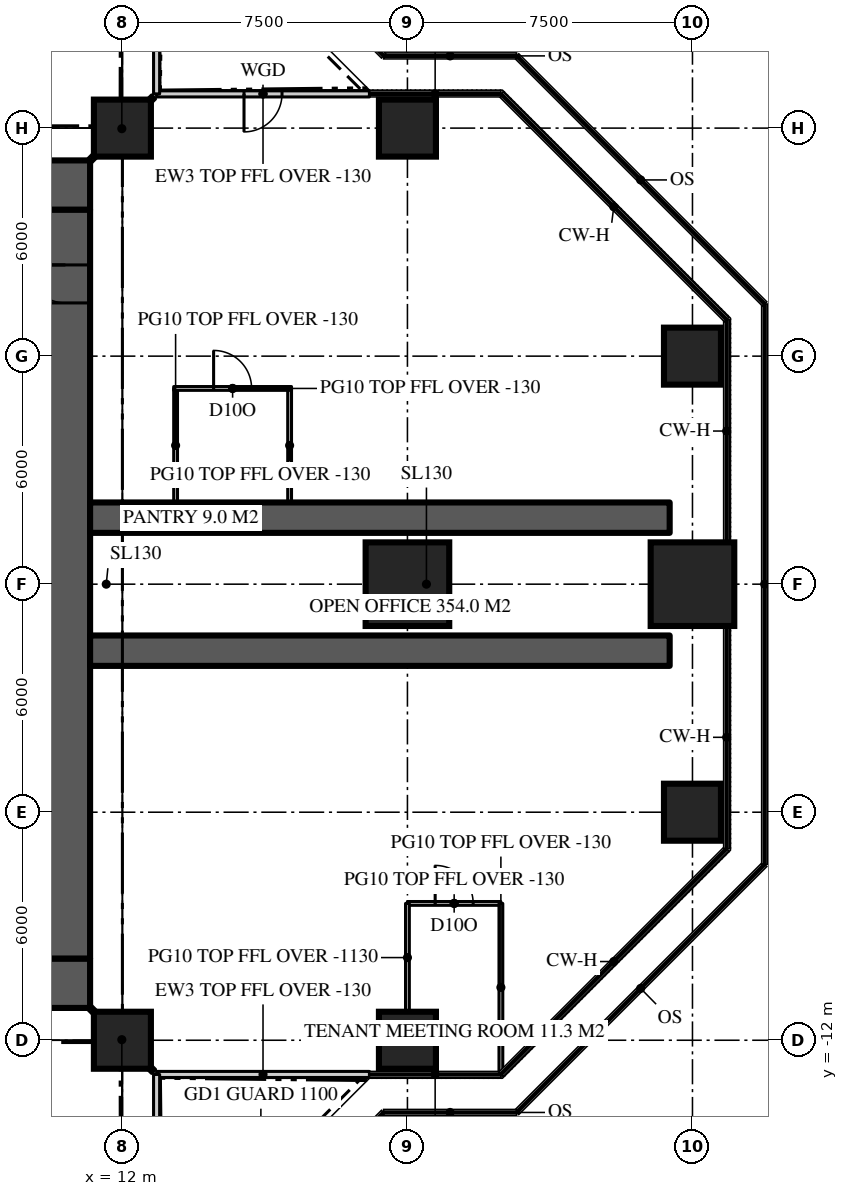
"""IFC4 building model, lengths in metres.
Left out: names, types, materials, properties, quantities, classifications, styles, units other than length and angle.
Written with IfcOpenShell. Run it as: python <this file> out.ifc"""

import sys

from ifc_helpers import new_model, si_unit, direction, frame, frame_2d, origin, origin_2d, place, context, subcontext, project, spatial, rectangle, extrude, element, fill, save


model = new_model("IFC4")
c1 = context("Model", 3, precision=1e-05, world=origin(), true_north=direction((0.0, 1.0)))
c2 = subcontext(c1, "Body", "Model", "MODEL_VIEW")
j1 = project(units=[si_unit("LENGTHUNIT", "METRE"), si_unit("PLANEANGLEUNIT", "RADIAN")], contexts=[c1])
p1 = place(None, origin())
s1 = spatial("IfcSite", under=j1, at=p1, CompositionType="ELEMENT")
p2 = place(p1, origin())
s2 = spatial("IfcBuilding", under=s1, at=p2, CompositionType="ELEMENT")
p3 = place(p2, frame((0.0, 0.0, 263.4)))
s3 = spatial("IfcBuildingStorey", under=s2, at=p3, CompositionType="ELEMENT", Elevation=263.4)
p4 = place(p3, frame((-11.15, 10.5, 0.0), z_axis=(0.0, 0.0, 1.0), x_axis=(1.0, 0.0, 0.0)))
e1 = element("IfcWall", 1, at=p4, inside=s3, PredefinedType="SHEAR", context=c2, shape_type="SweptSolid", body=[
    extrude(rectangle(XDim=22.3, YDim=1.3, at=frame_2d((11.15, 0.0))), origin(), (0.0, 0.0, 1.0), 3.9),
])
p5 = place(p4, frame((4.25, 0.0, 0.0)))
e2 = element("IfcOpeningElement", 2, at=p5, cuts=e1, PredefinedType="OPENING", context=c2, shape_type="SweptSolid", body=[
    extrude(rectangle(XDim=1.8, YDim=2.2, at=frame_2d((0.9, 1.1))), frame((0.0, 0.66, 0.0), z_axis=(0.0, -1.0, 0.0), x_axis=(1.0, 0.0, 0.0)), (0.0, 0.0, 1.0), 1.32),
])
p6 = place(p4, frame((16.25, 0.0, 0.0)))
e3 = element("IfcOpeningElement", 3, at=p6, cuts=e1, PredefinedType="OPENING", context=c2, shape_type="SweptSolid", body=[
    extrude(rectangle(XDim=1.8, YDim=2.2, at=frame_2d((0.9, 1.1))), frame((0.0, 0.66, 0.0), z_axis=(0.0, -1.0, 0.0), x_axis=(1.0, 0.0, 0.0)), (0.0, 0.0, 1.0), 1.32),
])
p7 = place(p3, frame((11.15, -10.5, 0.0), z_axis=(0.0, 0.0, 1.0), x_axis=(-1.0, 0.0, 0.0)))
e4 = element("IfcWall", 4, at=p7, inside=s3, PredefinedType="SHEAR", context=c2, shape_type="SweptSolid", body=[
    extrude(rectangle(XDim=22.3, YDim=1.3, at=frame_2d((11.15, 0.0))), origin(), (0.0, 0.0, 1.0), 3.9),
])
p8 = place(p7, frame((16.25, 0.0, 0.0)))
e5 = element("IfcOpeningElement", 5, at=p8, cuts=e4, PredefinedType="OPENING", context=c2, shape_type="SweptSolid", body=[
    extrude(rectangle(XDim=1.8, YDim=2.2, at=frame_2d((0.9, 1.1))), frame((0.0, 0.66, 0.0), z_axis=(0.0, -1.0, 0.0), x_axis=(1.0, 0.0, 0.0)), (0.0, 0.0, 1.0), 1.32),
])
p9 = place(p7, frame((4.25, 0.0, 0.0)))
e6 = element("IfcOpeningElement", 6, at=p9, cuts=e4, PredefinedType="OPENING", context=c2, shape_type="SweptSolid", body=[
    extrude(rectangle(XDim=1.8, YDim=2.2, at=frame_2d((0.9, 1.1))), frame((0.0, 0.66, 0.0), z_axis=(0.0, -1.0, 0.0), x_axis=(1.0, 0.0, 0.0)), (0.0, 0.0, 1.0), 1.32),
])
p10 = place(p3, frame((10.5, -9.85, 0.0), z_axis=(0.0, 0.0, 1.0), x_axis=(0.0, 1.0, 0.0)))
e7 = element("IfcWall", 7, at=p10, inside=s3, PredefinedType="SHEAR", context=c2, shape_type="SweptSolid", body=[
    extrude(rectangle(XDim=19.7, YDim=1.3, at=frame_2d((9.85, 0.0))), origin(), (0.0, 0.0, 1.0), 3.9),
])
p11 = place(p10, frame((17.25, 0.0, 0.0)))
e8 = element("IfcOpeningElement", 8, at=p11, cuts=e7, PredefinedType="OPENING", context=c2, shape_type="SweptSolid", body=[
    extrude(rectangle(XDim=1.0, YDim=2.2, at=frame_2d((0.5, 1.1))), frame((0.0, 0.66, 0.0), z_axis=(0.0, -1.0, 0.0), x_axis=(1.0, 0.0, 0.0)), (0.0, 0.0, 1.0), 1.32),
])
for number, where, z_axis, x_axis in (
    (9, (11.15, -1.75, 0.0), (0.0, 0.0, 1.0), (1.0, 0.0, 0.0)),
    (10, (11.15, 1.75, 0.0), (0.0, 0.0, 1.0), (1.0, 0.0, 0.0)),
):
    element("IfcWall", number, at=place(p3, frame(where, z_axis=z_axis, x_axis=x_axis)), inside=s3, PredefinedType="SHEAR", context=c2, shape_type="SweptSolid", body=[
        extrude(rectangle(XDim=15.25, YDim=0.8, at=frame_2d((7.625, 0.0))), origin(), (0.0, 0.0, 1.0), 3.9),
    ])
for number, where, z_axis, x_axis in (
    (11, (12.0, -12.0, 0.0), (0.0, 0.0, 1.0), (1.0, 0.0, 0.0)),
    (12, (19.5, -12.0, 0.0), (0.0, 0.0, 1.0), (1.0, 0.0, 0.0)),
    (13, (27.0, -6.0, 0.0), (0.0, 0.0, 1.0), (1.0, 0.0, 0.0)),
):
    element("IfcColumn", number, at=place(p3, frame(where, z_axis=z_axis, x_axis=x_axis)), inside=s3, PredefinedType="COLUMN", context=c2, shape_type="SweptSolid", body=[
        extrude(rectangle(XDim=1.5, YDim=1.5, at=origin_2d()), origin(), (0.0, 0.0, 1.0), 3.9),
    ])
for number, where, z_axis, x_axis in (
    (14, (19.5, 0.0, 0.0), (0.0, 0.0, 1.0), (1.0, 0.0, 0.0)),
    (15, (27.0, 0.0, 0.0), (0.0, 0.0, 1.0), (1.0, 0.0, 0.0)),
):
    element("IfcColumn", number, at=place(p3, frame(where, z_axis=z_axis, x_axis=x_axis)), inside=s3, PredefinedType="COLUMN", context=c2, shape_type="SweptSolid", body=[
        extrude(rectangle(XDim=2.2, YDim=2.2, at=origin_2d()), origin(), (0.0, 0.0, 1.0), 3.9),
    ])
for number, where, z_axis, x_axis in (
    (16, (27.0, 6.0, 0.0), (0.0, 0.0, 1.0), (1.0, 0.0, 0.0)),
    (17, (12.0, 12.0, 0.0), (0.0, 0.0, 1.0), (1.0, 0.0, 0.0)),
    (18, (19.5, 12.0, 0.0), (0.0, 0.0, 1.0), (1.0, 0.0, 0.0)),
):
    element("IfcColumn", number, at=place(p3, frame(where, z_axis=z_axis, x_axis=x_axis)), inside=s3, PredefinedType="COLUMN", context=c2, shape_type="SweptSolid", body=[
        extrude(rectangle(XDim=1.5, YDim=1.5, at=origin_2d()), origin(), (0.0, 0.0, 1.0), 3.9),
    ])
p12 = place(p3, frame((12.9, -12.9, 0.0), z_axis=(0.0, 0.0, 1.0), x_axis=(1.0, 0.0, 0.0)))
e19 = element("IfcWall", 19, at=p12, inside=s3, PredefinedType="SOLIDWALL", context=c2, shape_type="SweptSolid", body=[
    extrude(rectangle(XDim=5.6, YDim=0.16, at=frame_2d((2.8, 0.0))), origin(), (0.0, 0.0, 1.0), 3.77),
])
p13 = place(p3, frame((18.5, 12.9, 0.0), z_axis=(0.0, 0.0, 1.0), x_axis=(-1.0, 0.0, 0.0)))
e20 = element("IfcWall", 20, at=p13, inside=s3, PredefinedType="SOLIDWALL", context=c2, shape_type="SweptSolid", body=[
    extrude(rectangle(XDim=5.6, YDim=0.16, at=frame_2d((2.8, 0.0))), origin(), (0.0, 0.0, 1.0), 3.77),
])
p14 = place(p13, frame((2.3, 0.0, 0.0)))
e21 = element("IfcOpeningElement", 21, at=p14, cuts=e20, PredefinedType="OPENING", context=c2, shape_type="SweptSolid", body=[
    extrude(rectangle(XDim=1.0, YDim=2.2, at=frame_2d((0.5, 1.1))), frame((0.0, 0.09, 0.0), z_axis=(0.0, -1.0, 0.0), x_axis=(1.0, 0.0, 0.0)), (0.0, 0.0, 1.0), 0.18),
])
p15 = place(p3, frame((12.9, 12.9, 0.0), z_axis=(0.0, 0.0, 1.0), x_axis=(0.0, 1.0, 0.0)))
e22 = element("IfcWall", 22, at=p15, inside=s3, PredefinedType="SOLIDWALL", context=c2, shape_type="SweptSolid", body=[
    extrude(rectangle(XDim=5.6, YDim=0.16, at=frame_2d((2.8, 0.0))), origin(), (0.0, 0.0, 1.0), 3.65),
])
p16 = place(p3, frame((12.9, -18.5, 0.0), z_axis=(0.0, 0.0, 1.0), x_axis=(0.0, 1.0, 0.0)))
e23 = element("IfcWall", 23, at=p16, inside=s3, PredefinedType="SOLIDWALL", context=c2, shape_type="SweptSolid", body=[
    extrude(rectangle(XDim=5.6, YDim=0.16, at=frame_2d((2.8, 0.0))), origin(), (0.0, 0.0, 1.0), 3.77),
])
p17 = place(p16, frame((2.3, 0.0, 0.0)))
e24 = element("IfcOpeningElement", 24, at=p17, cuts=e23, PredefinedType="OPENING", context=c2, shape_type="SweptSolid", body=[
    extrude(rectangle(XDim=1.0, YDim=2.2, at=frame_2d((0.5, 1.1))), frame((0.0, 0.09, 0.0), z_axis=(0.0, -1.0, 0.0), x_axis=(1.0, 0.0, 0.0)), (0.0, 0.0, 1.0), 0.18),
])
p18 = place(p3, frame((19.5, -8.4, 0.0), z_axis=(0.0, 0.0, 1.0), x_axis=(1.0, 0.0, 0.0)))
e25 = element("IfcWall", 25, at=p18, inside=s3, PredefinedType="PARTITIONING", context=c2, shape_type="SweptSolid", body=[
    extrude(rectangle(XDim=2.459, YDim=0.1, at=frame_2d((1.229, 0.0))), origin(), (0.0, 0.0, 1.0), 3.77),
])
p19 = place(p18, frame((0.729, 0.0, 0.0)))
e26 = element("IfcOpeningElement", 26, at=p19, cuts=e25, PredefinedType="OPENING", context=c2, shape_type="SweptSolid", body=[
    extrude(rectangle(XDim=1.0, YDim=2.2, at=frame_2d((0.5, 1.1))), frame((0.0, 0.06, 0.0), z_axis=(0.0, -1.0, 0.0), x_axis=(1.0, 0.0, 0.0)), (0.0, 0.0, 1.0), 0.12),
])
p20 = place(p3, frame((19.5, -8.4, 0.0), z_axis=(0.0, 0.0, 1.0), x_axis=(0.0, -1.0, 0.0)))
e27 = element("IfcWall", 27, at=p20, inside=s3, PredefinedType="PARTITIONING", context=c2, shape_type="SweptSolid", body=[
    extrude(rectangle(XDim=2.85, YDim=0.1, at=frame_2d((1.425, 0.0))), origin(), (0.0, 0.0, 1.0), 2.77),
])
p21 = place(p3, frame((21.959, -8.4, 0.0), z_axis=(0.0, 0.0, 1.0), x_axis=(0.0, -1.0, 0.0)))
e28 = element("IfcWall", 28, at=p21, inside=s3, PredefinedType="PARTITIONING", context=c2, shape_type="SweptSolid", body=[
    extrude(rectangle(XDim=4.42, YDim=0.1, at=frame_2d((2.21, 0.0))), origin(), (0.0, 0.0, 1.0), 3.77),
])
for number, where, z_axis, x_axis in (
    (29, (13.4, 2.15, 0.0), (0.0, 0.0, 1.0), (0.0, 1.0, 0.0)),
    (30, (16.4, 2.15, 0.0), (0.0, 0.0, 1.0), (0.0, 1.0, 0.0)),
):
    element("IfcWall", number, at=place(p3, frame(where, z_axis=z_axis, x_axis=x_axis)), inside=s3, PredefinedType="PARTITIONING", context=c2, shape_type="SweptSolid", body=[
        extrude(rectangle(XDim=3.0, YDim=0.1, at=frame_2d((1.5, 0.0))), origin(), (0.0, 0.0, 1.0), 3.77),
    ])
p22 = place(p3, frame((13.35, 5.15, 0.0), z_axis=(0.0, 0.0, 1.0), x_axis=(1.0, 0.0, 0.0)))
e31 = element("IfcWall", 31, at=p22, inside=s3, PredefinedType="PARTITIONING", context=c2, shape_type="SweptSolid", body=[
    extrude(rectangle(XDim=3.1, YDim=0.1, at=frame_2d((1.55, 0.0))), origin(), (0.0, 0.0, 1.0), 3.77),
])
p23 = place(p22, frame((1.05, 0.0, 0.0)))
e32 = element("IfcOpeningElement", 32, at=p23, cuts=e31, PredefinedType="OPENING", context=c2, shape_type="SweptSolid", body=[
    extrude(rectangle(XDim=1.0, YDim=2.2, at=frame_2d((0.5, 1.1))), frame((0.0, 0.06, 0.0), z_axis=(0.0, -1.0, 0.0), x_axis=(1.0, 0.0, 0.0)), (0.0, 0.0, 1.0), 0.12),
])
p24 = place(p3, frame((11.15, 11.15, 0.0), z_axis=(0.0, 0.0, 1.0), x_axis=(0.707106781187, 0.707106781187, 0.0)))
e33 = element("IfcWall", 33, at=p24, inside=s3, PredefinedType="PARTITIONING", context=c2, shape_type="SweptSolid", body=[
    extrude(rectangle(XDim=2.362, YDim=0.15, at=frame_2d((1.181, 0.0))), origin(), (0.0, 0.0, 1.0), 3.77),
])
p25 = place(p3, frame((11.15, -11.15, 0.0), z_axis=(0.0, 0.0, 1.0), x_axis=(0.707106781187, -0.707106781187, 0.0)))
e34 = element("IfcWall", 34, at=p25, inside=s3, PredefinedType="PARTITIONING", context=c2, shape_type="SweptSolid", body=[
    extrude(rectangle(XDim=2.362, YDim=0.15, at=frame_2d((1.181, 0.0))), origin(), (0.0, 0.0, 1.0), 3.22),
])
p26 = place(p14, origin())
e35 = element("IfcDoor", 35, at=p26, inside=s3, OperationType="SINGLE_SWING_RIGHT", PredefinedType="DOOR", context=c2, shape_type="SweptSolid", body=[
    extrude(rectangle(XDim=1.0, YDim=2.2, at=frame_2d((0.5, 1.1))), frame((0.0, 0.025, 0.0), z_axis=(0.0, -1.0, 0.0), x_axis=(1.0, 0.0, 0.0)), (0.0, 0.0, 1.0), 0.05),
])
fill(e21, e35)
p27 = place(p11, origin())
e36 = element("IfcDoor", 36, at=p27, inside=s3, OperationType="SINGLE_SWING_RIGHT", PredefinedType="DOOR", context=c2, shape_type="SweptSolid", body=[
    extrude(rectangle(XDim=1.0, YDim=2.2, at=frame_2d((0.5, 1.1))), frame((0.0, 0.025, 0.0), z_axis=(0.0, -1.0, 0.0), x_axis=(1.0, 0.0, 0.0)), (0.0, 0.0, 1.0), 0.05),
])
fill(e8, e36)
p28 = place(p19, origin())
e37 = element("IfcDoor", 37, at=p28, inside=s3, OperationType="SINGLE_SWING_LEFT", PredefinedType="DOOR", context=c2, shape_type="SweptSolid", body=[
    extrude(rectangle(XDim=1.0, YDim=2.2, at=frame_2d((0.5, 1.1))), frame((0.0, 0.025, 0.0), z_axis=(0.0, -1.0, 0.0), x_axis=(1.0, 0.0, 0.0)), (0.0, 0.0, 1.0), 0.05),
])
fill(e26, e37)
p29 = place(p23, origin())
e38 = element("IfcDoor", 38, at=p29, inside=s3, OperationType="SINGLE_SWING_LEFT", PredefinedType="DOOR", context=c2, shape_type="SweptSolid", body=[
    extrude(rectangle(XDim=1.0, YDim=2.2, at=frame_2d((0.5, 1.1))), frame((0.0, 0.025, 0.0), z_axis=(0.0, -1.0, 0.0), x_axis=(1.0, 0.0, 0.0)), (0.0, 0.0, 1.0), 0.05),
])
fill(e32, e38)
save(model, sys.argv[1])
